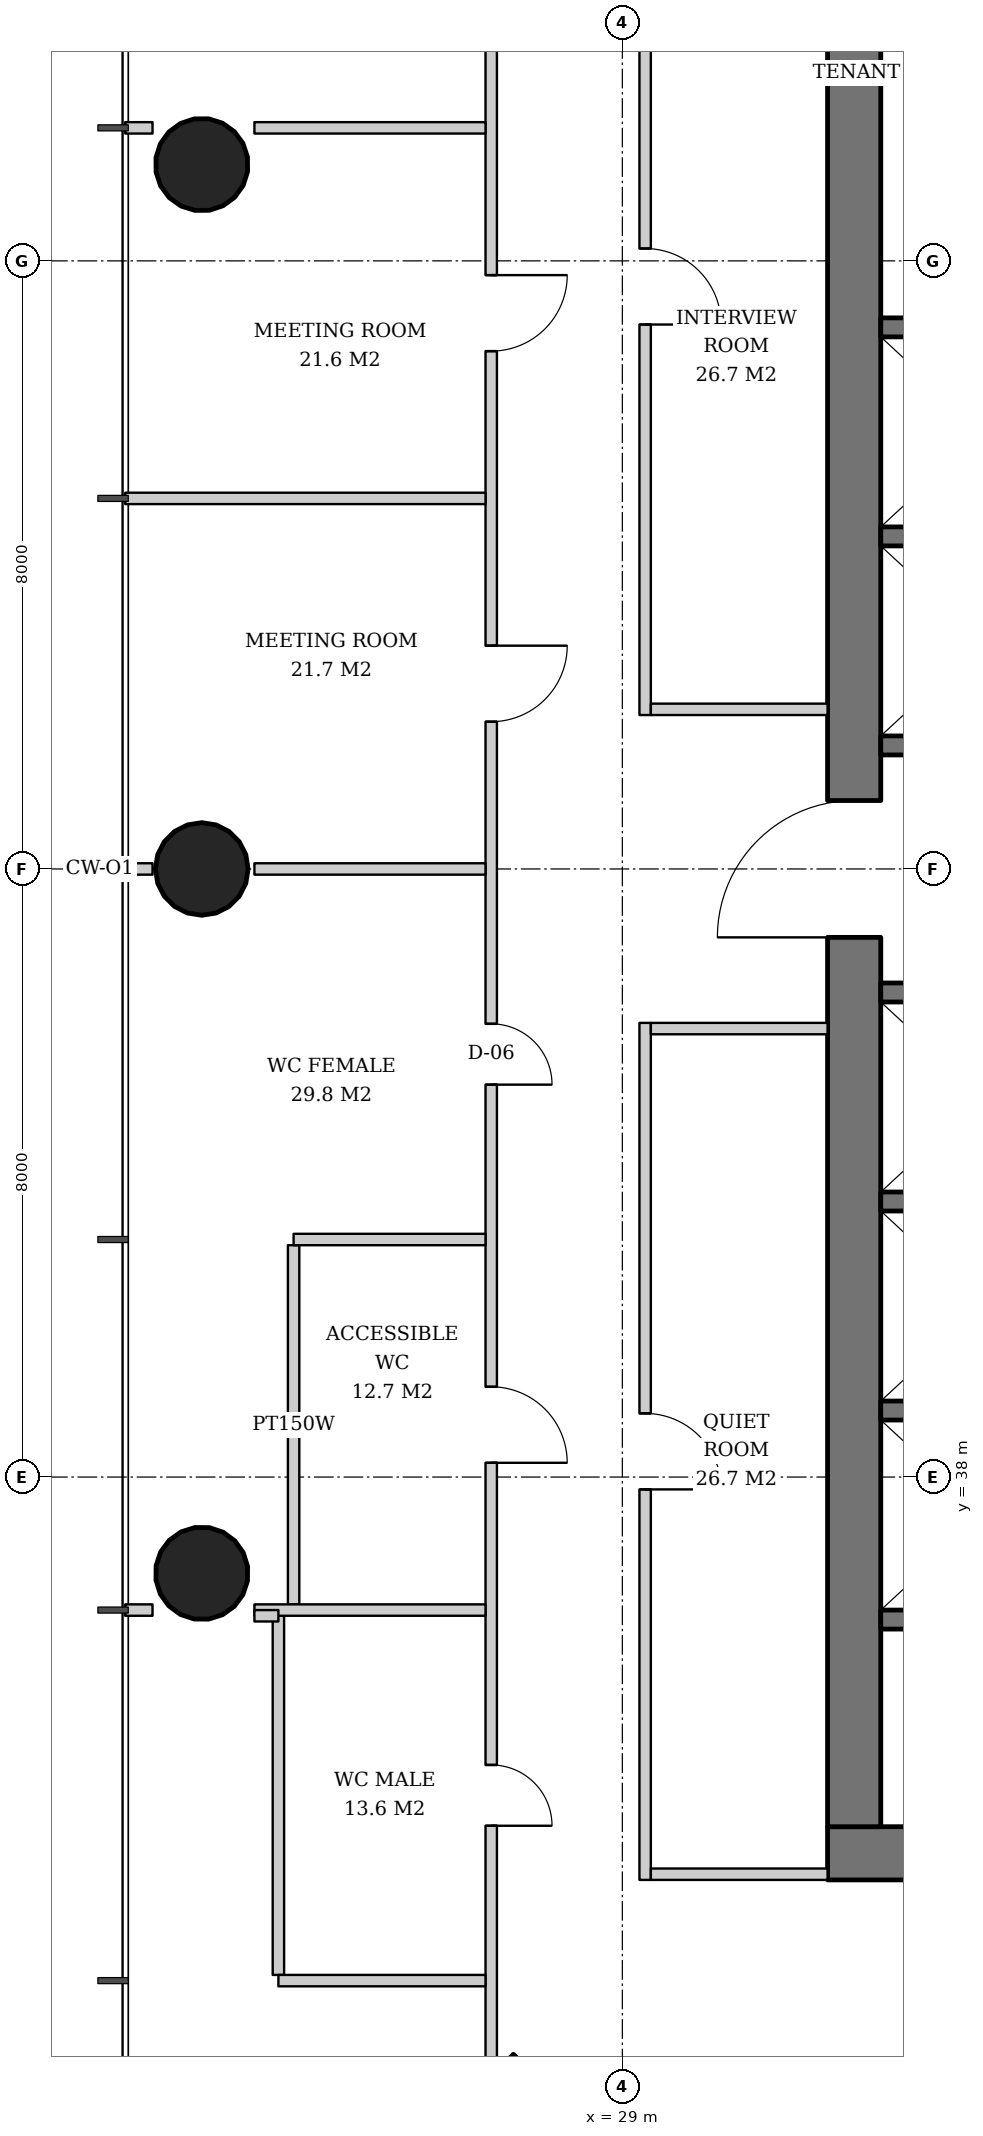
"""IFC4 building model, lengths in metres.
Left out: names, types, materials, properties, quantities, classifications, styles, units other than length and angle.
Written with IfcOpenShell. Run it as: python <this file> out.ifc"""

import sys

from ifc_helpers import new_model, si_unit, direction, frame, frame_2d, origin, origin_2d, place, context, subcontext, project, spatial, rectangle, hollow_circle, extrude, element, fill, save


model = new_model("IFC4")
c1 = context("Model", 3, precision=1e-05, world=origin(), true_north=direction((0.0, 1.0)))
c2 = subcontext(c1, "Body", "Model", "MODEL_VIEW")
j1 = project(units=[si_unit("LENGTHUNIT", "METRE"), si_unit("PLANEANGLEUNIT", "RADIAN")], contexts=[c1])
p1 = place(None, origin())
s1 = spatial("IfcSite", under=j1, at=p1, CompositionType="ELEMENT")
p2 = place(p1, origin())
s2 = spatial("IfcBuilding", under=s1, at=p2, CompositionType="ELEMENT")
p3 = place(p2, frame((0.0, 0.0, 97.0)))
s3 = spatial("IfcBuildingStorey", under=s2, at=p3, CompositionType="ELEMENT", Elevation=97.0)
p4 = place(p3, frame((27.529, 28.529, 0.0), z_axis=(0.031898107953, 0.031898107953, 0.998981992539), x_axis=(-0.707106781187, 0.707106781187, 0.0)))
e1 = element("IfcColumn", 1, at=p4, inside=s3, PredefinedType="COLUMN", context=c2, shape_type="SweptSolid", body=[
    extrude(rectangle(XDim=2.6, YDim=2.6, at=origin_2d()), origin(), (0.0, 0.0, 1.0), 3.804),
])
p5 = place(p3, frame((23.428, 55.286, 0.0), z_axis=(0.031974442509, -0.015923015547, 0.999361842679), x_axis=(0.445775033553, 0.895145027055, 0.0)))
e2 = element("IfcColumn", 2, at=p5, inside=s3, PredefinedType="COLUMN", context=c2, shape_type="SweptSolid", body=[
    extrude(hollow_circle(Radius=0.61, WallThickness=0.04, at=origin_2d()), origin(), (0.0, 0.0, 1.0), 3.802),
])
p6 = place(p3, frame((23.428, 46.0, 0.0), z_axis=(0.031978496719, 0.0, 0.999488557087), x_axis=(0.0, 1.0, 0.0)))
e3 = element("IfcColumn", 3, at=p6, inside=s3, PredefinedType="COLUMN", context=c2, shape_type="SweptSolid", body=[
    extrude(hollow_circle(Radius=0.61, WallThickness=0.04, at=origin_2d()), origin(), (0.0, 0.0, 1.0), 3.802),
])
p7 = place(p3, frame((23.428, 36.714, 0.0), z_axis=(0.031974442509, 0.015923015547, 0.999361842679), x_axis=(-0.445775033553, 0.895145027055, 0.0)))
e4 = element("IfcColumn", 4, at=p7, inside=s3, PredefinedType="COLUMN", context=c2, shape_type="SweptSolid", body=[
    extrude(hollow_circle(Radius=0.61, WallThickness=0.04, at=origin_2d()), origin(), (0.0, 0.0, 1.0), 3.802),
])
p8 = place(p3, frame((31.7, 33.05, 0.0), z_axis=(0.0, 0.0, 1.0), x_axis=(1.0, 0.0, 0.0)))
e5 = element("IfcWall", 5, at=p8, inside=s3, PredefinedType="SHEAR", context=c2, shape_type="SweptSolid", body=[
    extrude(rectangle(XDim=26.6, YDim=0.7, at=frame_2d((13.3, 0.0))), origin(), (0.0, 0.0, 1.0), 3.8),
])
p9 = place(p8, frame((7.3, 0.0, 0.0)))
e6 = element("IfcOpeningElement", 6, at=p9, cuts=e5, PredefinedType="OPENING", context=c2, shape_type="SweptSolid", body=[
    extrude(rectangle(XDim=1.0, YDim=2.1, at=frame_2d((0.5, 1.05))), frame((0.0, 0.36, 0.0), z_axis=(0.0, -1.0, 0.0), x_axis=(1.0, 0.0, 0.0)), (0.0, 0.0, 1.0), 0.72),
])
p10 = place(p8, frame((18.75, 0.0, 0.0)))
e7 = element("IfcOpeningElement", 7, at=p10, cuts=e5, PredefinedType="OPENING", context=c2, shape_type="SweptSolid", body=[
    extrude(rectangle(XDim=1.0, YDim=2.1, at=frame_2d((0.5, 1.05))), frame((0.0, 0.36, 0.0), z_axis=(0.0, -1.0, 0.0), x_axis=(1.0, 0.0, 0.0)), (0.0, 0.0, 1.0), 0.72),
])
p11 = place(p8, frame((3.2, 0.0, 0.0)))
e8 = element("IfcOpeningElement", 8, at=p11, cuts=e5, PredefinedType="OPENING", context=c2, shape_type="SweptSolid", body=[
    extrude(rectangle(XDim=1.0, YDim=2.1, at=frame_2d((0.5, 1.05))), frame((0.0, 0.36, 0.0), z_axis=(0.0, -1.0, 0.0), x_axis=(1.0, 0.0, 0.0)), (0.0, 0.0, 1.0), 0.72),
])
p12 = place(p8, frame((10.42, 0.0, 0.0)))
e9 = element("IfcOpeningElement", 9, at=p12, cuts=e5, PredefinedType="OPENING", context=c2, shape_type="SweptSolid", body=[
    extrude(rectangle(XDim=1.0, YDim=2.1, at=frame_2d((0.5, 1.05))), frame((0.0, 0.36, 0.0), z_axis=(0.0, -1.0, 0.0), x_axis=(1.0, 0.0, 0.0)), (0.0, 0.0, 1.0), 0.72),
])
p13 = place(p8, frame((14.46, 0.0, 0.0)))
e10 = element("IfcOpeningElement", 10, at=p13, cuts=e5, PredefinedType="OPENING", context=c2, shape_type="SweptSolid", body=[
    extrude(rectangle(XDim=1.0, YDim=2.1, at=frame_2d((0.5, 1.05))), frame((0.0, 0.36, 0.0), z_axis=(0.0, -1.0, 0.0), x_axis=(1.0, 0.0, 0.0)), (0.0, 0.0, 1.0), 0.72),
])
p14 = place(p8, frame((22.5, 0.0, 0.0)))
e11 = element("IfcOpeningElement", 11, at=p14, cuts=e5, PredefinedType="OPENING", context=c2, shape_type="SweptSolid", body=[
    extrude(rectangle(XDim=1.0, YDim=2.1, at=frame_2d((0.5, 1.05))), frame((0.0, 0.36, 0.0), z_axis=(0.0, -1.0, 0.0), x_axis=(1.0, 0.0, 0.0)), (0.0, 0.0, 1.0), 0.72),
])
p15 = place(p3, frame((32.05, 33.4, 0.0), z_axis=(0.0, 0.0, 1.0), x_axis=(0.0, 1.0, 0.0)))
e12 = element("IfcWall", 12, at=p15, inside=s3, PredefinedType="SHEAR", context=c2, shape_type="SweptSolid", body=[
    extrude(rectangle(XDim=25.2, YDim=0.7, at=frame_2d((12.6, 0.0))), origin(), (0.0, 0.0, 1.0), 3.8),
])
p16 = place(p15, frame((11.7, 0.0, 0.0)))
e13 = element("IfcOpeningElement", 13, at=p16, cuts=e12, PredefinedType="OPENING", context=c2, shape_type="SweptSolid", body=[
    extrude(rectangle(XDim=1.8, YDim=2.4, at=frame_2d((0.9, 1.2))), frame((0.0, 0.36, 0.0), z_axis=(0.0, -1.0, 0.0), x_axis=(1.0, 0.0, 0.0)), (0.0, 0.0, 1.0), 0.72),
])
for number, where, z_axis, x_axis in (
    (14, (32.4, 36.125, 0.0), (0.0, 0.0, 1.0), (1.0, 0.0, 0.0)),
    (15, (32.4, 38.875, 0.0), (0.0, 0.0, 1.0), (1.0, 0.0, 0.0)),
    (16, (32.4, 41.625, 0.0), (0.0, 0.0, 1.0), (1.0, 0.0, 0.0)),
    (17, (32.4, 44.375, 0.0), (0.0, 0.0, 1.0), (1.0, 0.0, 0.0)),
    (18, (32.4, 47.625, 0.0), (0.0, 0.0, 1.0), (1.0, 0.0, 0.0)),
    (19, (32.4, 50.375, 0.0), (0.0, 0.0, 1.0), (1.0, 0.0, 0.0)),
    (20, (32.4, 53.125, 0.0), (0.0, 0.0, 1.0), (1.0, 0.0, 0.0)),
):
    element("IfcWall", number, at=place(p3, frame(where, z_axis=z_axis, x_axis=x_axis)), inside=s3, PredefinedType="SHEAR", context=c2, shape_type="SweptSolid", body=[
        extrude(rectangle(XDim=2.7, YDim=0.25, at=frame_2d((1.35, 0.0))), origin(), (0.0, 0.0, 1.0), 3.8),
    ])
p17 = place(p3, frame((29.3, 59.3, 0.0), z_axis=(0.0, 0.0, 1.0), x_axis=(0.0, -1.0, 0.0)))
e21 = element("IfcWall", 21, at=p17, inside=s3, PredefinedType="PARTITIONING", context=c2, shape_type="SweptSolid", body=[
    extrude(rectangle(XDim=11.275, YDim=0.15, at=frame_2d((5.638, 0.0))), origin(), (0.0, 0.0, 1.0), 2.72),
])
p18 = place(p17, frame((5.137, 0.0, 0.0)))
e22 = element("IfcOpeningElement", 22, at=p18, cuts=e21, PredefinedType="OPENING", context=c2, shape_type="SweptSolid", body=[
    extrude(rectangle(XDim=1.0, YDim=2.1, at=frame_2d((0.5, 1.05))), frame((0.0, 0.085, 0.0), z_axis=(0.0, -1.0, 0.0), x_axis=(1.0, 0.0, 0.0)), (0.0, 0.0, 1.0), 0.17),
])
p19 = place(p3, frame((31.7, 48.1, 0.0), z_axis=(0.0, 0.0, 1.0), x_axis=(-1.0, 0.0, 0.0)))
e23 = element("IfcWall", 23, at=p19, inside=s3, PredefinedType="PARTITIONING", context=c2, shape_type="SweptSolid", body=[
    extrude(rectangle(XDim=2.325, YDim=0.15, at=frame_2d((1.163, 0.0))), origin(), (0.0, 0.0, 1.0), 3.62),
])
p20 = place(p3, frame((29.3, 43.975, 0.0), z_axis=(0.0, 0.0, 1.0), x_axis=(0.0, -1.0, 0.0)))
e24 = element("IfcWall", 24, at=p20, inside=s3, PredefinedType="PARTITIONING", context=c2, shape_type="SweptSolid", body=[
    extrude(rectangle(XDim=11.275, YDim=0.15, at=frame_2d((5.638, 0.0))), origin(), (0.0, 0.0, 1.0), 2.806),
])
p21 = place(p20, frame((5.137, 0.0, 0.0)))
e25 = element("IfcOpeningElement", 25, at=p21, cuts=e24, PredefinedType="OPENING", context=c2, shape_type="SweptSolid", body=[
    extrude(rectangle(XDim=1.0, YDim=2.1, at=frame_2d((0.5, 1.05))), frame((0.0, 0.085, 0.0), z_axis=(0.0, -1.0, 0.0), x_axis=(1.0, 0.0, 0.0)), (0.0, 0.0, 1.0), 0.17),
])
for number, where, z_axis, x_axis in (
    (26, (31.7, 43.9, 0.0), (0.0, 0.0, 1.0), (-1.0, 0.0, 0.0)),
    (27, (31.7, 32.775, 0.0), (0.0, 0.0, 1.0), (-1.0, 0.0, 0.0)),
):
    element("IfcWall", number, at=place(p3, frame(where, z_axis=z_axis, x_axis=x_axis)), inside=s3, PredefinedType="PARTITIONING", context=c2, shape_type="SweptSolid", body=[
        extrude(rectangle(XDim=2.325, YDim=0.15, at=frame_2d((1.163, 0.0))), origin(), (0.0, 0.0, 1.0), 3.62),
    ])
p22 = place(p3, frame((24.675, 41.05, 0.0), z_axis=(0.0, 0.0, 1.0), x_axis=(0.0, -1.0, 0.0)))
e28 = element("IfcWall", 28, at=p22, inside=s3, PredefinedType="PARTITIONING", context=c2, shape_type="SweptSolid", body=[
    extrude(rectangle(XDim=4.725, YDim=0.15, at=frame_2d((2.363, 0.0))), origin(), (0.0, 0.0, 1.0), 2.806),
])
p23 = place(p3, frame((24.475, 36.175, 0.0), z_axis=(0.0, 0.0, 1.0), x_axis=(0.0, -1.0, 0.0)))
e29 = element("IfcWall", 29, at=p23, inside=s3, PredefinedType="PARTITIONING", context=c2, shape_type="SweptSolid", body=[
    extrude(rectangle(XDim=4.725, YDim=0.15, at=frame_2d((2.363, 0.0))), origin(), (0.0, 0.0, 1.0), 3.62),
])
p24 = place(p3, frame((27.275, 61.812, 0.0), z_axis=(0.0, 0.0, 1.0), x_axis=(0.0, -1.0, 0.0)))
e30 = element("IfcWall", 30, at=p24, inside=s3, PredefinedType="PARTITIONING", context=c2, shape_type="SweptSolid", body=[
    extrude(rectangle(XDim=31.623, YDim=0.15, at=frame_2d((15.812, 0.0))), origin(), (0.0, 0.0, 1.0), 2.72),
])
p25 = place(p24, frame((3.124, 0.0, 0.0)))
e31 = element("IfcOpeningElement", 31, at=p25, cuts=e30, PredefinedType="OPENING", context=c2, shape_type="SweptSolid", body=[
    extrude(rectangle(XDim=1.0, YDim=2.1, at=frame_2d((0.5, 1.05))), frame((0.0, 0.085, 0.0), z_axis=(0.0, -1.0, 0.0), x_axis=(1.0, 0.0, 0.0)), (0.0, 0.0, 1.0), 0.17),
])
p26 = place(p24, frame((7.999, 0.0, 0.0)))
e32 = element("IfcOpeningElement", 32, at=p26, cuts=e30, PredefinedType="OPENING", context=c2, shape_type="SweptSolid", body=[
    extrude(rectangle(XDim=1.0, YDim=2.1, at=frame_2d((0.5, 1.05))), frame((0.0, 0.085, 0.0), z_axis=(0.0, -1.0, 0.0), x_axis=(1.0, 0.0, 0.0)), (0.0, 0.0, 1.0), 0.17),
])
p27 = place(p24, frame((12.874, 0.0, 0.0)))
e33 = element("IfcOpeningElement", 33, at=p27, cuts=e30, PredefinedType="OPENING", context=c2, shape_type="SweptSolid", body=[
    extrude(rectangle(XDim=1.0, YDim=2.1, at=frame_2d((0.5, 1.05))), frame((0.0, 0.085, 0.0), z_axis=(0.0, -1.0, 0.0), x_axis=(1.0, 0.0, 0.0)), (0.0, 0.0, 1.0), 0.17),
])
p28 = place(p24, frame((17.849, 0.0, 0.0)))
e34 = element("IfcOpeningElement", 34, at=p28, cuts=e30, PredefinedType="OPENING", context=c2, shape_type="SweptSolid", body=[
    extrude(rectangle(XDim=0.8, YDim=2.1, at=frame_2d((0.4, 1.05))), frame((0.0, 0.085, 0.0), z_axis=(0.0, -1.0, 0.0), x_axis=(1.0, 0.0, 0.0)), (0.0, 0.0, 1.0), 0.17),
])
p29 = place(p24, frame((22.624, 0.0, 0.0)))
e35 = element("IfcOpeningElement", 35, at=p29, cuts=e30, PredefinedType="OPENING", context=c2, shape_type="SweptSolid", body=[
    extrude(rectangle(XDim=1.0, YDim=2.1, at=frame_2d((0.5, 1.05))), frame((0.0, 0.085, 0.0), z_axis=(0.0, -1.0, 0.0), x_axis=(1.0, 0.0, 0.0)), (0.0, 0.0, 1.0), 0.17),
])
p30 = place(p24, frame((27.599, 0.0, 0.0)))
e36 = element("IfcOpeningElement", 36, at=p30, cuts=e30, PredefinedType="OPENING", context=c2, shape_type="SweptSolid", body=[
    extrude(rectangle(XDim=0.8, YDim=2.1, at=frame_2d((0.4, 1.05))), frame((0.0, 0.085, 0.0), z_axis=(0.0, -1.0, 0.0), x_axis=(1.0, 0.0, 0.0)), (0.0, 0.0, 1.0), 0.17),
])
p31 = place(p3, frame((27.2, 55.75, 0.0), z_axis=(0.0, 0.0, 1.0), x_axis=(-1.0, 0.0, 0.0)))
e37 = element("IfcWall", 37, at=p31, inside=s3, PredefinedType="PARTITIONING", context=c2, shape_type="SweptSolid", body=[
    extrude(rectangle(XDim=3.041, YDim=0.15, at=frame_2d((1.52, 0.0))), origin(), (0.0, 0.0, 1.0), 3.62),
])
p32 = place(p3, frame((22.819, 55.75, 0.0), z_axis=(0.0, 0.0, 1.0), x_axis=(-1.0, 0.0, 0.0)))
e38 = element("IfcWall", 38, at=p32, inside=s3, PredefinedType="PARTITIONING", context=c2, shape_type="SweptSolid", body=[
    extrude(rectangle(XDim=0.359, YDim=0.15, at=frame_2d((0.18, 0.0))), origin(), (0.0, 0.0, 1.0), 3.62),
])
p33 = place(p3, frame((27.2, 50.875, 0.0), z_axis=(0.0, 0.0, 1.0), x_axis=(-1.0, 0.0, 0.0)))
e39 = element("IfcWall", 39, at=p33, inside=s3, PredefinedType="PARTITIONING", context=c2, shape_type="SweptSolid", body=[
    extrude(rectangle(XDim=4.74, YDim=0.15, at=frame_2d((2.37, 0.0))), origin(), (0.0, 0.0, 1.0), 2.82),
])
p34 = place(p3, frame((27.2, 46.0, 0.0), z_axis=(0.0, 0.0, 1.0), x_axis=(-1.0, 0.0, 0.0)))
e40 = element("IfcWall", 40, at=p34, inside=s3, PredefinedType="PARTITIONING", context=c2, shape_type="SweptSolid", body=[
    extrude(rectangle(XDim=3.041, YDim=0.15, at=frame_2d((1.52, 0.0))), origin(), (0.0, 0.0, 1.0), 2.858),
])
p35 = place(p3, frame((22.819, 46.0, 0.0), z_axis=(0.0, 0.0, 1.0), x_axis=(-1.0, 0.0, 0.0)))
e41 = element("IfcWall", 41, at=p35, inside=s3, PredefinedType="PARTITIONING", context=c2, shape_type="SweptSolid", body=[
    extrude(rectangle(XDim=0.359, YDim=0.15, at=frame_2d((0.18, 0.0))), origin(), (0.0, 0.0, 1.0), 3.62),
])
p36 = place(p3, frame((27.2, 41.125, 0.0), z_axis=(0.0, 0.0, 1.0), x_axis=(-1.0, 0.0, 0.0)))
e42 = element("IfcWall", 42, at=p36, inside=s3, PredefinedType="PARTITIONING", context=c2, shape_type="SweptSolid", body=[
    extrude(rectangle(XDim=2.525, YDim=0.15, at=frame_2d((1.262, 0.0))), origin(), (0.0, 0.0, 1.0), 3.62),
])
p37 = place(p3, frame((27.2, 36.25, 0.0), z_axis=(0.0, 0.0, 1.0), x_axis=(-1.0, 0.0, 0.0)))
e43 = element("IfcWall", 43, at=p37, inside=s3, PredefinedType="PARTITIONING", context=c2, shape_type="SweptSolid", body=[
    extrude(rectangle(XDim=3.041, YDim=0.15, at=frame_2d((1.52, 0.0))), origin(), (0.0, 0.0, 1.0), 3.62),
])
p38 = place(p3, frame((22.819, 36.25, 0.0), z_axis=(0.0, 0.0, 1.0), x_axis=(-1.0, 0.0, 0.0)))
e44 = element("IfcWall", 44, at=p38, inside=s3, PredefinedType="PARTITIONING", context=c2, shape_type="SweptSolid", body=[
    extrude(rectangle(XDim=0.359, YDim=0.15, at=frame_2d((0.18, 0.0))), origin(), (0.0, 0.0, 1.0), 3.62),
])
p39 = place(p3, frame((27.2, 31.375, 0.0), z_axis=(0.0, 0.0, 1.0), x_axis=(-1.0, 0.0, 0.0)))
e45 = element("IfcWall", 45, at=p39, inside=s3, PredefinedType="PARTITIONING", context=c2, shape_type="SweptSolid", body=[
    extrude(rectangle(XDim=2.725, YDim=0.15, at=frame_2d((1.362, 0.0))), origin(), (0.0, 0.0, 1.0), 3.62),
])
p40 = place(p3, frame((24.475, 36.175, 0.0), z_axis=(0.0, 0.0, 1.0), x_axis=(-1.0, 0.0, 0.0)))
e46 = element("IfcWall", 46, at=p40, inside=s3, PredefinedType="PARTITIONING", context=c2, shape_type="SweptSolid", body=[
    extrude(rectangle(XDim=0.316, YDim=0.15, at=frame_2d((0.158, 0.0))), origin(), (0.0, 0.0, 1.0), 3.62),
])
p41 = place(p16, origin())
e47 = element("IfcDoor", 47, at=p41, inside=s3, OperationType="DOUBLE_DOOR_SINGLE_SWING", PredefinedType="DOOR", context=c2, shape_type="SweptSolid", body=[
    extrude(rectangle(XDim=1.8, YDim=2.4, at=frame_2d((0.9, 1.2))), frame((0.0, 0.025, 0.0), z_axis=(0.0, -1.0, 0.0), x_axis=(1.0, 0.0, 0.0)), (0.0, 0.0, 1.0), 0.05),
])
fill(e13, e47)
p42 = place(p18, origin())
e48 = element("IfcDoor", 48, at=p42, inside=s3, OperationType="SINGLE_SWING_RIGHT", PredefinedType="DOOR", context=c2, shape_type="SweptSolid", body=[
    extrude(rectangle(XDim=1.0, YDim=2.1, at=frame_2d((0.5, 1.05))), frame((0.0, 0.025, 0.0), z_axis=(0.0, -1.0, 0.0), x_axis=(1.0, 0.0, 0.0)), (0.0, 0.0, 1.0), 0.05),
])
fill(e22, e48)
p43 = place(p21, origin())
e49 = element("IfcDoor", 49, at=p43, inside=s3, OperationType="SINGLE_SWING_RIGHT", PredefinedType="DOOR", context=c2, shape_type="SweptSolid", body=[
    extrude(rectangle(XDim=1.0, YDim=2.1, at=frame_2d((0.5, 1.05))), frame((0.0, 0.025, 0.0), z_axis=(0.0, -1.0, 0.0), x_axis=(1.0, 0.0, 0.0)), (0.0, 0.0, 1.0), 0.05),
])
fill(e25, e49)
p44 = place(p26, origin())
e50 = element("IfcDoor", 50, at=p44, inside=s3, OperationType="SINGLE_SWING_LEFT", PredefinedType="DOOR", context=c2, shape_type="SweptSolid", body=[
    extrude(rectangle(XDim=1.0, YDim=2.1, at=frame_2d((0.5, 1.05))), frame((0.0, 0.025, 0.0), z_axis=(0.0, -1.0, 0.0), x_axis=(1.0, 0.0, 0.0)), (0.0, 0.0, 1.0), 0.05),
])
fill(e32, e50)
p45 = place(p27, origin())
e51 = element("IfcDoor", 51, at=p45, inside=s3, OperationType="SINGLE_SWING_LEFT", PredefinedType="DOOR", context=c2, shape_type="SweptSolid", body=[
    extrude(rectangle(XDim=1.0, YDim=2.1, at=frame_2d((0.5, 1.05))), frame((0.0, 0.025, 0.0), z_axis=(0.0, -1.0, 0.0), x_axis=(1.0, 0.0, 0.0)), (0.0, 0.0, 1.0), 0.05),
])
fill(e33, e51)
p46 = place(p28, origin())
e52 = element("IfcDoor", 52, at=p46, inside=s3, OperationType="SINGLE_SWING_RIGHT", PredefinedType="DOOR", context=c2, shape_type="SweptSolid", body=[
    extrude(rectangle(XDim=0.8, YDim=2.1, at=frame_2d((0.4, 1.05))), frame((0.0, 0.025, 0.0), z_axis=(0.0, -1.0, 0.0), x_axis=(1.0, 0.0, 0.0)), (0.0, 0.0, 1.0), 0.05),
])
fill(e34, e52)
p47 = place(p29, origin())
e53 = element("IfcDoor", 53, at=p47, inside=s3, OperationType="SINGLE_SWING_RIGHT", PredefinedType="DOOR", context=c2, shape_type="SweptSolid", body=[
    extrude(rectangle(XDim=1.0, YDim=2.1, at=frame_2d((0.5, 1.05))), frame((0.0, 0.025, 0.0), z_axis=(0.0, -1.0, 0.0), x_axis=(1.0, 0.0, 0.0)), (0.0, 0.0, 1.0), 0.05),
])
fill(e35, e53)
p48 = place(p30, origin())
e54 = element("IfcDoor", 54, at=p48, inside=s3, OperationType="SINGLE_SWING_RIGHT", PredefinedType="DOOR", context=c2, shape_type="SweptSolid", body=[
    extrude(rectangle(XDim=0.8, YDim=2.1, at=frame_2d((0.4, 1.05))), frame((0.0, 0.025, 0.0), z_axis=(0.0, -1.0, 0.0), x_axis=(1.0, 0.0, 0.0)), (0.0, 0.0, 1.0), 0.05),
])
fill(e36, e54)
save(model, sys.argv[1])
